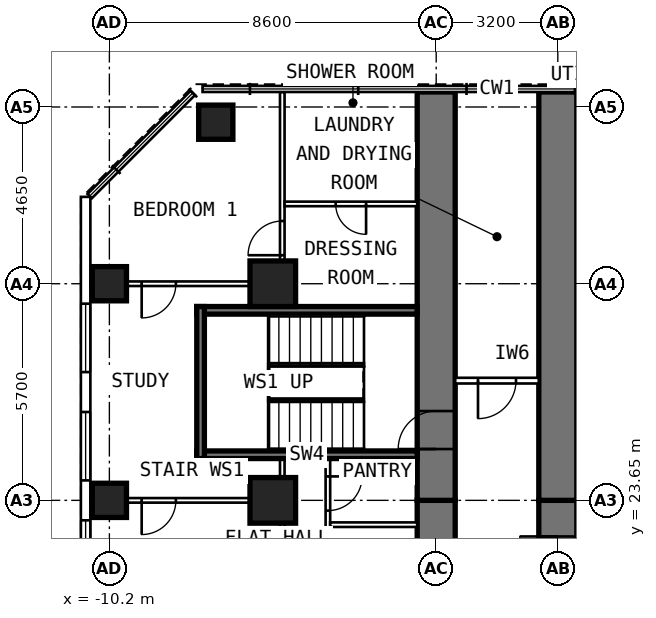
"""IFC4 building model, lengths in metres.
Left out: names, types, materials, properties, quantities, classifications, styles, units other than length and angle.
Written with IfcOpenShell. Run it as: python <this file> out.ifc"""

import sys

from ifc_helpers import new_model, si_unit, direction, frame, frame_2d, origin, origin_2d, place, context, subcontext, project, spatial, rectangle, extrude, element, fill, save


model = new_model("IFC4")
c1 = context("Model", 3, precision=1e-05, world=origin(), true_north=direction((0.0, 1.0)))
c2 = subcontext(c1, "Body", "Model", "MODEL_VIEW")
j1 = project(units=[si_unit("LENGTHUNIT", "METRE"), si_unit("PLANEANGLEUNIT", "RADIAN")], contexts=[c1])
p1 = place(None, origin())
s1 = spatial("IfcSite", under=j1, at=p1, CompositionType="ELEMENT")
p2 = place(p1, origin())
s2 = spatial("IfcBuilding", under=s1, at=p2, CompositionType="ELEMENT")
p3 = place(p2, frame((0.0, 0.0, 84.4)))
s3 = spatial("IfcBuildingStorey", under=s2, at=p3, CompositionType="ELEMENT", Elevation=84.4)
for number, where, z_axis, x_axis in (
    (1, (-10.2, 23.65, 0.0), (0.0, 0.0, 1.0), (0.0, 1.0, 0.0)),
    (2, (-10.2, 29.35, 0.0), (0.0, 0.0, 1.0), (0.0, 1.0, 0.0)),
    (3, (-7.4, 33.6, 0.0), (0.0, 0.0, 1.0), (0.0, 1.0, 0.0)),
):
    element("IfcColumn", number, at=place(p3, frame(where, z_axis=z_axis, x_axis=x_axis)), inside=s3, PredefinedType="COLUMN", context=c2, shape_type="SweptSolid", body=[
        extrude(rectangle(XDim=0.9, YDim=0.9, at=origin_2d()), origin(), (0.0, 0.0, 1.0), 3.6),
    ])
for number, where, z_axis, x_axis in (
    (4, (-5.9, 23.65, 0.0), (0.0, 0.0, 1.0), (0.0, 1.0, 0.0)),
    (5, (-5.9, 29.35, 0.0), (0.0, 0.0, 1.0), (0.0, 1.0, 0.0)),
):
    element("IfcColumn", number, at=place(p3, frame(where, z_axis=z_axis, x_axis=x_axis)), inside=s3, PredefinedType="COLUMN", context=c2, shape_type="SweptSolid", body=[
        extrude(rectangle(XDim=1.2, YDim=1.2, at=origin_2d()), origin(), (0.0, 0.0, 1.0), 3.6),
    ])
p4 = place(p3, frame((-1.6, 17.95, 0.0), z_axis=(0.0, 0.0, 1.0), x_axis=(0.0, 1.0, 0.0)))
e6 = element("IfcWall", 6, at=p4, inside=s3, PredefinedType="SHEAR", context=c2, shape_type="SweptSolid", body=[
    extrude(rectangle(XDim=5.7, YDim=1.0, at=frame_2d((2.85, 0.0))), origin(), (0.0, 0.0, 1.0), 3.6),
])
p5 = place(p4, frame((0.9, 0.0, 0.0)))
e7 = element("IfcOpeningElement", 7, at=p5, cuts=e6, PredefinedType="OPENING", context=c2, shape_type="SweptSolid", body=[
    extrude(rectangle(XDim=1.0, YDim=2.1, at=frame_2d((0.5, 1.05))), frame((0.0, 0.512, 0.0), z_axis=(0.0, -1.0, 0.0), x_axis=(1.0, 0.0, 0.0)), (0.0, 0.0, 1.0), 1.024),
])
p6 = place(p3, frame((-1.6, 23.65, 0.0), z_axis=(0.0, 0.0, 1.0), x_axis=(0.0, 1.0, 0.0)))
e8 = element("IfcWall", 8, at=p6, inside=s3, PredefinedType="SHEAR", context=c2, shape_type="SweptSolid", body=[
    extrude(rectangle(XDim=10.745, YDim=1.0, at=frame_2d((5.373, 0.0))), origin(), (0.0, 0.0, 1.0), 3.6),
])
p7 = place(p6, frame((1.35, 0.0, 0.0)))
e9 = element("IfcOpeningElement", 9, at=p7, cuts=e8, PredefinedType="OPENING", context=c2, shape_type="SweptSolid", body=[
    extrude(rectangle(XDim=1.0, YDim=2.1, at=frame_2d((0.5, 1.05))), frame((0.0, 0.512, 0.0), z_axis=(0.0, -1.0, 0.0), x_axis=(1.0, 0.0, 0.0)), (0.0, 0.0, 1.0), 1.024),
])
p8 = place(p3, frame((1.6, 17.95, 0.0), z_axis=(0.0, 0.0, 1.0), x_axis=(0.0, 1.0, 0.0)))
e10 = element("IfcWall", 10, at=p8, inside=s3, PredefinedType="SHEAR", context=c2, shape_type="SweptSolid", body=[
    extrude(rectangle(XDim=5.7, YDim=1.0, at=frame_2d((2.85, 0.0))), origin(), (0.0, 0.0, 1.0), 3.6),
])
p9 = place(p8, frame((3.75, 0.0, 0.0)))
e11 = element("IfcOpeningElement", 11, at=p9, cuts=e10, PredefinedType="OPENING", context=c2, shape_type="SweptSolid", body=[
    extrude(rectangle(XDim=1.0, YDim=2.1, at=frame_2d((0.5, 1.05))), frame((0.0, 0.512, 0.0), z_axis=(0.0, -1.0, 0.0), x_axis=(1.0, 0.0, 0.0)), (0.0, 0.0, 1.0), 1.024),
])
p10 = place(p3, frame((1.6, 23.65, 0.0), z_axis=(0.0, 0.0, 1.0), x_axis=(0.0, 1.0, 0.0)))
e12 = element("IfcWall", 12, at=p10, inside=s3, PredefinedType="SHEAR", context=c2, shape_type="SweptSolid", body=[
    extrude(rectangle(XDim=10.745, YDim=1.0, at=frame_2d((5.373, 0.0))), origin(), (0.0, 0.0, 1.0), 3.6),
])
p11 = place(p3, frame((-10.825, 6.148, 0.0), z_axis=(0.0, 0.0, 1.0), x_axis=(0.0, 1.0, 0.0)))
e13 = element("IfcWall", 13, at=p11, inside=s3, PredefinedType="SOLIDWALL", context=c2, shape_type="SweptSolid", body=[
    extrude(rectangle(XDim=25.487, YDim=0.25, at=frame_2d((12.744, 0.0))), origin(), (0.0, 0.0, 1.0), 3.35),
])
p12 = place(p11, frame((0.927, 0.0, 0.8)))
e14 = element("IfcOpeningElement", 14, at=p12, cuts=e13, PredefinedType="OPENING", context=c2, shape_type="SweptSolid", body=[
    extrude(rectangle(XDim=1.8, YDim=1.8, at=frame_2d((0.9, 0.9))), frame((0.0, 0.137, 0.0), z_axis=(0.0, -1.0, 0.0), x_axis=(1.0, 0.0, 0.0)), (0.0, 0.0, 1.0), 0.274),
])
p13 = place(p11, frame((3.777, 0.0, 0.8)))
e15 = element("IfcOpeningElement", 15, at=p13, cuts=e13, PredefinedType="OPENING", context=c2, shape_type="SweptSolid", body=[
    extrude(rectangle(XDim=1.8, YDim=1.8, at=frame_2d((0.9, 0.9))), frame((0.0, 0.137, 0.0), z_axis=(0.0, -1.0, 0.0), x_axis=(1.0, 0.0, 0.0)), (0.0, 0.0, 1.0), 0.274),
])
p14 = place(p11, frame((6.627, 0.0, 0.8)))
e16 = element("IfcOpeningElement", 16, at=p14, cuts=e13, PredefinedType="OPENING", context=c2, shape_type="SweptSolid", body=[
    extrude(rectangle(XDim=1.8, YDim=1.8, at=frame_2d((0.9, 0.9))), frame((0.0, 0.137, 0.0), z_axis=(0.0, -1.0, 0.0), x_axis=(1.0, 0.0, 0.0)), (0.0, 0.0, 1.0), 0.274),
])
p15 = place(p11, frame((9.477, 0.0, 0.8)))
e17 = element("IfcOpeningElement", 17, at=p15, cuts=e13, PredefinedType="OPENING", context=c2, shape_type="SweptSolid", body=[
    extrude(rectangle(XDim=1.8, YDim=1.8, at=frame_2d((0.9, 0.9))), frame((0.0, 0.137, 0.0), z_axis=(0.0, -1.0, 0.0), x_axis=(1.0, 0.0, 0.0)), (0.0, 0.0, 1.0), 0.274),
])
p16 = place(p11, frame((12.327, 0.0, 0.8)))
e18 = element("IfcOpeningElement", 18, at=p16, cuts=e13, PredefinedType="OPENING", context=c2, shape_type="SweptSolid", body=[
    extrude(rectangle(XDim=1.8, YDim=1.8, at=frame_2d((0.9, 0.9))), frame((0.0, 0.137, 0.0), z_axis=(0.0, -1.0, 0.0), x_axis=(1.0, 0.0, 0.0)), (0.0, 0.0, 1.0), 0.274),
])
p17 = place(p11, frame((15.177, 0.0, 0.8)))
e19 = element("IfcOpeningElement", 19, at=p17, cuts=e13, PredefinedType="OPENING", context=c2, shape_type="SweptSolid", body=[
    extrude(rectangle(XDim=1.8, YDim=1.8, at=frame_2d((0.9, 0.9))), frame((0.0, 0.137, 0.0), z_axis=(0.0, -1.0, 0.0), x_axis=(1.0, 0.0, 0.0)), (0.0, 0.0, 1.0), 0.274),
])
p18 = place(p11, frame((18.027, 0.0, 0.8)))
e20 = element("IfcOpeningElement", 20, at=p18, cuts=e13, PredefinedType="OPENING", context=c2, shape_type="SweptSolid", body=[
    extrude(rectangle(XDim=1.8, YDim=1.8, at=frame_2d((0.9, 0.9))), frame((0.0, 0.137, 0.0), z_axis=(0.0, -1.0, 0.0), x_axis=(1.0, 0.0, 0.0)), (0.0, 0.0, 1.0), 0.274),
])
p19 = place(p11, frame((20.877, 0.0, 0.8)))
e21 = element("IfcOpeningElement", 21, at=p19, cuts=e13, PredefinedType="OPENING", context=c2, shape_type="SweptSolid", body=[
    extrude(rectangle(XDim=1.8, YDim=1.8, at=frame_2d((0.9, 0.9))), frame((0.0, 0.137, 0.0), z_axis=(0.0, -1.0, 0.0), x_axis=(1.0, 0.0, 0.0)), (0.0, 0.0, 1.0), 0.274),
])
p20 = place(p3, frame((-4.45, 18.05, 0.0), z_axis=(0.0, 0.0, 1.0), x_axis=(0.0, 1.0, 0.0)))
e22 = element("IfcWall", 22, at=p20, inside=s3, PredefinedType="PARTITIONING", context=c2, shape_type="SweptSolid", body=[
    extrude(rectangle(XDim=6.7, YDim=0.12, at=frame_2d((3.35, 0.0))), origin(), (0.0, 0.0, 1.0), 3.35),
])
p21 = place(p20, frame((0.75, 0.0, 0.0)))
e23 = element("IfcOpeningElement", 23, at=p21, cuts=e22, PredefinedType="OPENING", context=c2, shape_type="SweptSolid", body=[
    extrude(rectangle(XDim=0.9, YDim=2.1, at=frame_2d((0.45, 1.05))), frame((0.0, 0.072, 0.0), z_axis=(0.0, -1.0, 0.0), x_axis=(1.0, 0.0, 0.0)), (0.0, 0.0, 1.0), 0.144),
])
p22 = place(p20, frame((3.33, 0.0, 0.0)))
e24 = element("IfcOpeningElement", 24, at=p22, cuts=e22, PredefinedType="OPENING", context=c2, shape_type="SweptSolid", body=[
    extrude(rectangle(XDim=0.8, YDim=2.1, at=frame_2d((0.4, 1.05))), frame((0.0, 0.072, 0.0), z_axis=(0.0, -1.0, 0.0), x_axis=(1.0, 0.0, 0.0)), (0.0, 0.0, 1.0), 0.144),
])
p23 = place(p20, frame((5.33, 0.0, 0.0)))
e25 = element("IfcOpeningElement", 25, at=p23, cuts=e22, PredefinedType="OPENING", context=c2, shape_type="SweptSolid", body=[
    extrude(rectangle(XDim=0.9, YDim=2.1, at=frame_2d((0.45, 1.05))), frame((0.0, 0.072, 0.0), z_axis=(0.0, -1.0, 0.0), x_axis=(1.0, 0.0, 0.0)), (0.0, 0.0, 1.0), 0.144),
])
p24 = place(p3, frame((-5.65, 18.05, 0.0), z_axis=(0.0, 0.0, 1.0), x_axis=(0.0, 1.0, 0.0)))
e26 = element("IfcWall", 26, at=p24, inside=s3, PredefinedType="PARTITIONING", context=c2, shape_type="SweptSolid", body=[
    extrude(rectangle(XDim=6.7, YDim=0.12, at=frame_2d((3.35, 0.0))), origin(), (0.0, 0.0, 1.0), 3.35),
])
p25 = place(p24, frame((2.3, 0.0, 0.0)))
e27 = element("IfcOpeningElement", 27, at=p25, cuts=e26, PredefinedType="OPENING", context=c2, shape_type="SweptSolid", body=[
    extrude(rectangle(XDim=0.9, YDim=2.1, at=frame_2d((0.45, 1.05))), frame((0.0, 0.072, 0.0), z_axis=(0.0, -1.0, 0.0), x_axis=(1.0, 0.0, 0.0)), (0.0, 0.0, 1.0), 0.144),
])
p26 = place(p3, frame((-2.1, 23.01, 0.0), z_axis=(0.0, 0.0, 1.0), x_axis=(-1.0, 0.0, 0.0)))
e28 = element("IfcWall", 28, at=p26, inside=s3, PredefinedType="PARTITIONING", context=c2, shape_type="SweptSolid", body=[
    extrude(rectangle(XDim=2.29, YDim=0.12, at=frame_2d((1.145, 0.0))), origin(), (0.0, 0.0, 1.0), 3.35),
])
p27 = place(p3, frame((-5.71, 23.65, 0.0), z_axis=(0.0, 0.0, 1.0), x_axis=(-1.0, 0.0, 0.0)))
e29 = element("IfcWall", 29, at=p27, inside=s3, PredefinedType="PARTITIONING", context=c2, shape_type="SweptSolid", body=[
    extrude(rectangle(XDim=4.99, YDim=0.12, at=frame_2d((2.495, 0.0))), origin(), (0.0, 0.0, 1.0), 2.45),
])
p28 = place(p27, frame((2.74, 0.0, 0.0)))
e30 = element("IfcOpeningElement", 30, at=p28, cuts=e29, PredefinedType="OPENING", context=c2, shape_type="SweptSolid", body=[
    extrude(rectangle(XDim=0.9, YDim=2.1, at=frame_2d((0.45, 1.05))), frame((0.0, 0.072, 0.0), z_axis=(0.0, -1.0, 0.0), x_axis=(1.0, 0.0, 0.0)), (0.0, 0.0, 1.0), 0.144),
])
p29 = place(p3, frame((-5.71, 29.35, 0.0), z_axis=(0.0, 0.0, 1.0), x_axis=(-1.0, 0.0, 0.0)))
e31 = element("IfcWall", 31, at=p29, inside=s3, PredefinedType="PARTITIONING", context=c2, shape_type="SweptSolid", body=[
    extrude(rectangle(XDim=4.99, YDim=0.12, at=frame_2d((2.495, 0.0))), origin(), (0.0, 0.0, 1.0), 2.45),
])
p30 = place(p29, frame((2.74, 0.0, 0.0)))
e32 = element("IfcOpeningElement", 32, at=p30, cuts=e31, PredefinedType="OPENING", context=c2, shape_type="SweptSolid", body=[
    extrude(rectangle(XDim=0.9, YDim=2.1, at=frame_2d((0.45, 1.05))), frame((0.0, 0.072, 0.0), z_axis=(0.0, -1.0, 0.0), x_axis=(1.0, 0.0, 0.0)), (0.0, 0.0, 1.0), 0.144),
])
p31 = place(p3, frame((-5.65, 28.95, 0.0), z_axis=(0.0, 0.0, 1.0), x_axis=(0.0, 1.0, 0.0)))
e33 = element("IfcWall", 33, at=p31, inside=s3, PredefinedType="PARTITIONING", context=c2, shape_type="SweptSolid", body=[
    extrude(rectangle(XDim=5.445, YDim=0.12, at=frame_2d((2.723, 0.0))), origin(), (0.0, 0.0, 1.0), 3.35),
])
p32 = place(p31, frame((1.15, 0.0, 0.0)))
e34 = element("IfcOpeningElement", 34, at=p32, cuts=e33, PredefinedType="OPENING", context=c2, shape_type="SweptSolid", body=[
    extrude(rectangle(XDim=0.9, YDim=2.1, at=frame_2d((0.45, 1.05))), frame((0.0, 0.072, 0.0), z_axis=(0.0, -1.0, 0.0), x_axis=(1.0, 0.0, 0.0)), (0.0, 0.0, 1.0), 0.144),
])
p33 = place(p3, frame((-2.1, 31.45, 0.0), z_axis=(0.0, 0.0, 1.0), x_axis=(-1.0, 0.0, 0.0)))
e35 = element("IfcWall", 35, at=p33, inside=s3, PredefinedType="PARTITIONING", context=c2, shape_type="SweptSolid", body=[
    extrude(rectangle(XDim=3.49, YDim=0.12, at=frame_2d((1.745, 0.0))), origin(), (0.0, 0.0, 1.0), 3.35),
])
p34 = place(p33, frame((1.345, 0.0, 0.0)))
e36 = element("IfcOpeningElement", 36, at=p34, cuts=e35, PredefinedType="OPENING", context=c2, shape_type="SweptSolid", body=[
    extrude(rectangle(XDim=0.8, YDim=2.1, at=frame_2d((0.4, 1.05))), frame((0.0, 0.072, 0.0), z_axis=(0.0, -1.0, 0.0), x_axis=(1.0, 0.0, 0.0)), (0.0, 0.0, 1.0), 0.144),
])
p35 = place(p3, frame((1.1, 26.8, 0.0), z_axis=(0.0, 0.0, 1.0), x_axis=(-1.0, 0.0, 0.0)))
e37 = element("IfcWall", 37, at=p35, inside=s3, PredefinedType="PARTITIONING", context=c2, shape_type="SweptSolid", body=[
    extrude(rectangle(XDim=2.2, YDim=0.15, at=frame_2d((1.1, 0.0))), origin(), (0.0, 0.0, 1.0), 3.35),
])
p36 = place(p35, frame((0.6, 0.0, 0.0)))
e38 = element("IfcOpeningElement", 38, at=p36, cuts=e37, PredefinedType="OPENING", context=c2, shape_type="SweptSolid", body=[
    extrude(rectangle(XDim=1.0, YDim=2.1, at=frame_2d((0.5, 1.05))), frame((0.0, 0.087, 0.0), z_axis=(0.0, -1.0, 0.0), x_axis=(1.0, 0.0, 0.0)), (0.0, 0.0, 1.0), 0.174),
])
for number, where, z_axis, x_axis in (
    (39, (-2.1, 24.85, 0.0), (0.0, 0.0, 1.0), (-1.0, 0.0, 0.0)),
    (40, (-2.1, 28.65, 0.0), (0.0, 0.0, 1.0), (-1.0, 0.0, 0.0)),
):
    element("IfcWall", number, at=place(p3, frame(where, z_axis=z_axis, x_axis=x_axis)), inside=s3, PredefinedType="SHEAR", context=c2, shape_type="SweptSolid", body=[
        extrude(rectangle(XDim=5.8, YDim=0.2, at=frame_2d((2.9, 0.0))), origin(), (0.0, 0.0, 1.0), 3.33),
    ])
p37 = place(p3, frame((-7.8, 24.75, 0.0), z_axis=(0.0, 0.0, 1.0), x_axis=(0.0, 1.0, 0.0)))
e41 = element("IfcWall", 41, at=p37, inside=s3, PredefinedType="SHEAR", context=c2, shape_type="SweptSolid", body=[
    extrude(rectangle(XDim=4.0, YDim=0.2, at=frame_2d((2.0, 0.0))), origin(), (0.0, 0.0, 1.0), 3.33),
])
p38 = place(p17, origin())
e42 = element("IfcWindow", 42, at=p38, inside=s3, PartitioningType="SINGLE_PANEL", PredefinedType="WINDOW", context=c2, shape_type="SweptSolid", body=[
    extrude(rectangle(XDim=1.8, YDim=1.8, at=frame_2d((0.9, 0.9))), frame((0.0, 0.03, 0.0), z_axis=(0.0, -1.0, 0.0), x_axis=(1.0, 0.0, 0.0)), (0.0, 0.0, 1.0), 0.06),
])
fill(e19, e42)
p39 = place(p18, origin())
e43 = element("IfcWindow", 43, at=p39, inside=s3, PartitioningType="SINGLE_PANEL", PredefinedType="WINDOW", context=c2, shape_type="SweptSolid", body=[
    extrude(rectangle(XDim=1.8, YDim=1.8, at=frame_2d((0.9, 0.9))), frame((0.0, 0.03, 0.0), z_axis=(0.0, -1.0, 0.0), x_axis=(1.0, 0.0, 0.0)), (0.0, 0.0, 1.0), 0.06),
])
fill(e20, e43)
p40 = place(p19, origin())
e44 = element("IfcWindow", 44, at=p40, inside=s3, PartitioningType="SINGLE_PANEL", PredefinedType="WINDOW", context=c2, shape_type="SweptSolid", body=[
    extrude(rectangle(XDim=1.8, YDim=1.8, at=frame_2d((0.9, 0.9))), frame((0.0, 0.03, 0.0), z_axis=(0.0, -1.0, 0.0), x_axis=(1.0, 0.0, 0.0)), (0.0, 0.0, 1.0), 0.06),
])
fill(e21, e44)
p41 = place(p23, frame((0.9, 0.0, 0.0), z_axis=(0.0, 0.0, 1.0), x_axis=(-1.0, 0.0, 0.0)))
e45 = element("IfcDoor", 45, at=p41, inside=s3, OperationType="SINGLE_SWING_LEFT", PredefinedType="DOOR", context=c2, shape_type="SweptSolid", body=[
    extrude(rectangle(XDim=0.9, YDim=2.1, at=frame_2d((0.45, 1.05))), frame((0.0, 0.025, 0.0), z_axis=(0.0, -1.0, 0.0), x_axis=(1.0, 0.0, 0.0)), (0.0, 0.0, 1.0), 0.05),
])
fill(e25, e45)
p42 = place(p30, origin())
e46 = element("IfcDoor", 46, at=p42, inside=s3, OperationType="SINGLE_SWING_RIGHT", PredefinedType="DOOR", context=c2, shape_type="SweptSolid", body=[
    extrude(rectangle(XDim=0.9, YDim=2.1, at=frame_2d((0.45, 1.05))), frame((0.0, 0.025, 0.0), z_axis=(0.0, -1.0, 0.0), x_axis=(1.0, 0.0, 0.0)), (0.0, 0.0, 1.0), 0.05),
])
fill(e32, e46)
p43 = place(p32, origin())
e47 = element("IfcDoor", 47, at=p43, inside=s3, OperationType="SINGLE_SWING_LEFT", PredefinedType="DOOR", context=c2, shape_type="SweptSolid", body=[
    extrude(rectangle(XDim=0.9, YDim=2.1, at=frame_2d((0.45, 1.05))), frame((0.0, 0.025, 0.0), z_axis=(0.0, -1.0, 0.0), x_axis=(1.0, 0.0, 0.0)), (0.0, 0.0, 1.0), 0.05),
])
fill(e34, e47)
p44 = place(p34, origin())
e48 = element("IfcDoor", 48, at=p44, inside=s3, OperationType="SINGLE_SWING_LEFT", PredefinedType="DOOR", context=c2, shape_type="SweptSolid", body=[
    extrude(rectangle(XDim=0.8, YDim=2.1, at=frame_2d((0.4, 1.05))), frame((0.0, 0.025, 0.0), z_axis=(0.0, -1.0, 0.0), x_axis=(1.0, 0.0, 0.0)), (0.0, 0.0, 1.0), 0.05),
])
fill(e36, e48)
p45 = place(p28, origin())
e49 = element("IfcDoor", 49, at=p45, inside=s3, OperationType="SINGLE_SWING_RIGHT", PredefinedType="DOOR", context=c2, shape_type="SweptSolid", body=[
    extrude(rectangle(XDim=0.9, YDim=2.1, at=frame_2d((0.45, 1.05))), frame((0.0, 0.025, 0.0), z_axis=(0.0, -1.0, 0.0), x_axis=(1.0, 0.0, 0.0)), (0.0, 0.0, 1.0), 0.05),
])
fill(e30, e49)
p46 = place(p9, origin())
e50 = element("IfcDoor", 50, at=p46, inside=s3, OperationType="SINGLE_SWING_RIGHT", PredefinedType="DOOR", context=c2, shape_type="SweptSolid", body=[
    extrude(rectangle(XDim=1.0, YDim=2.1, at=frame_2d((0.5, 1.05))), frame((0.0, 0.25, 0.0), z_axis=(0.0, -1.0, 0.0), x_axis=(1.0, 0.0, 0.0)), (0.0, 0.0, 1.0), 0.5),
])
fill(e11, e50)
p47 = place(p36, origin())
e51 = element("IfcDoor", 51, at=p47, inside=s3, OperationType="SINGLE_SWING_RIGHT", PredefinedType="DOOR", context=c2, shape_type="SweptSolid", body=[
    extrude(rectangle(XDim=1.0, YDim=2.1, at=frame_2d((0.5, 1.05))), frame((0.0, 0.025, 0.0), z_axis=(0.0, -1.0, 0.0), x_axis=(1.0, 0.0, 0.0)), (0.0, 0.0, 1.0), 0.05),
])
fill(e38, e51)
p48 = place(p7, origin())
e52 = element("IfcDoor", 52, at=p48, inside=s3, OperationType="SINGLE_SWING_LEFT", PredefinedType="DOOR", context=c2, shape_type="SweptSolid", body=[
    extrude(rectangle(XDim=1.0, YDim=2.1, at=frame_2d((0.5, 1.05))), frame((0.0, 0.25, 0.0), z_axis=(0.0, -1.0, 0.0), x_axis=(1.0, 0.0, 0.0)), (0.0, 0.0, 1.0), 0.5),
])
fill(e9, e52)
save(model, sys.argv[1])
